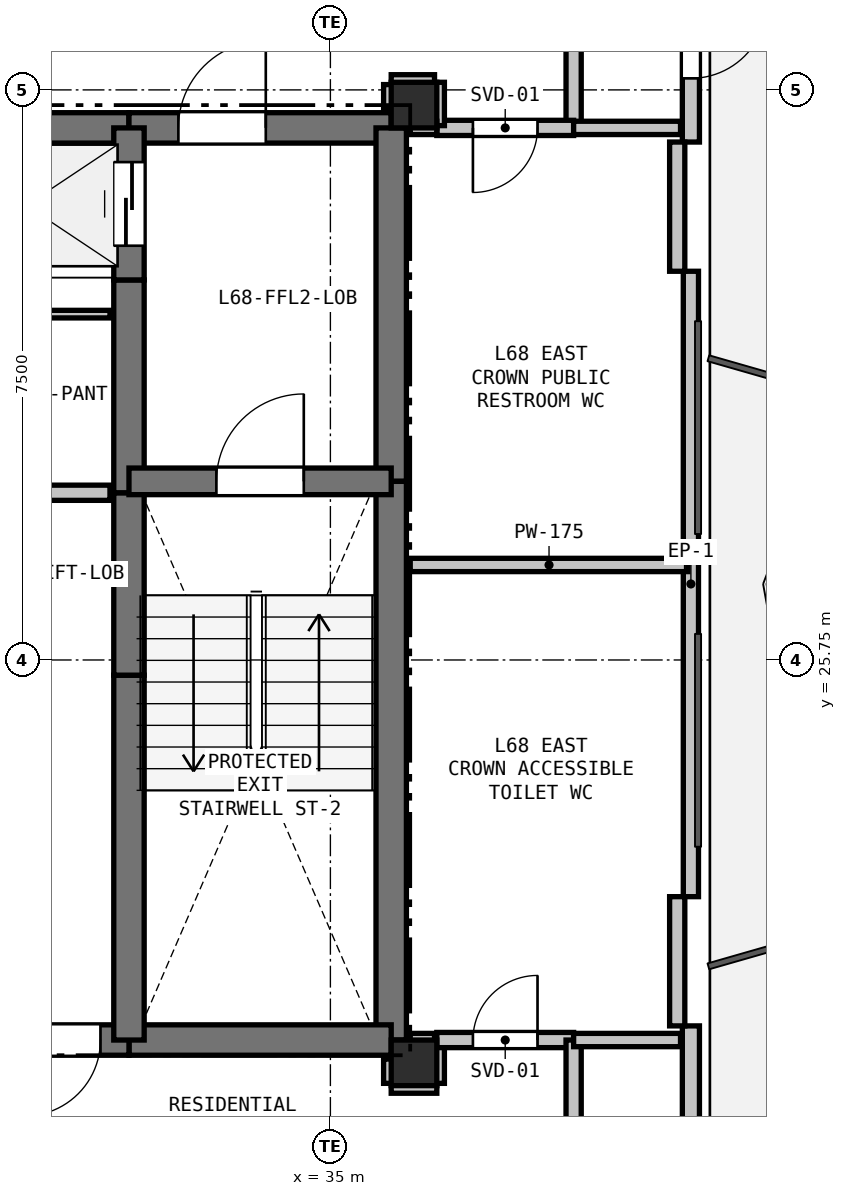
"""IFC4 building model, lengths in metres.
Left out: names, types, materials, properties, quantities, classifications, styles, units other than length and angle.
Written with IfcOpenShell. Run it as: python <this file> out.ifc"""

import sys

from ifc_helpers import new_model, si_unit, direction, frame, frame_2d, origin, origin_2d, place, context, subcontext, project, spatial, rectangle, extrude, element, fill, save


model = new_model("IFC4")
c1 = context("Model", 3, precision=1e-05, world=origin(), true_north=direction((0.0, 1.0)))
c2 = subcontext(c1, "Body", "Model", "MODEL_VIEW")
j1 = project(units=[si_unit("LENGTHUNIT", "METRE"), si_unit("PLANEANGLEUNIT", "RADIAN")], contexts=[c1])
p1 = place(None, origin())
s1 = spatial("IfcSite", under=j1, at=p1, CompositionType="ELEMENT")
p2 = place(p1, origin())
s2 = spatial("IfcBuilding", under=s1, at=p2, CompositionType="ELEMENT")
p3 = place(p2, frame((0.0, 0.0, 243.0)))
s3 = spatial("IfcBuildingStorey", under=s2, at=p3, CompositionType="ELEMENT", Elevation=243.0)
for number, where, z_axis, x_axis in (
    (1, (36.1, 33.05, 0.0), (0.0, 0.0, 1.0), (1.0, 0.0, 0.0)),
    (2, (36.1, 20.45, 0.0), (0.0, 0.0, 1.0), (1.0, 0.0, 0.0)),
):
    element("IfcColumn", number, at=place(p3, frame(where, z_axis=z_axis, x_axis=x_axis)), inside=s3, PredefinedType="COLUMN", context=c2, shape_type="SweptSolid", body=[
        extrude(rectangle(XDim=0.6, YDim=0.6, at=origin_2d()), origin(), (0.0, 0.0, 1.0), 3.3),
    ])
p4 = place(p3, frame((39.743, 41.492, 0.0), z_axis=(0.0, 0.0, 1.0), x_axis=(0.0, -1.0, 0.0)))
e3 = element("IfcWall", 3, at=p4, inside=s3, PredefinedType="SOLIDWALL", context=c2, shape_type="SweptSolid", body=[
    extrude(rectangle(XDim=8.928, YDim=0.225, at=frame_2d((4.464, 0.0))), origin(), (0.0, 0.0, 1.0), 2.7),
])
p5 = place(p4, frame((7.09, 0.0, 0.0)))
e4 = element("IfcOpeningElement", 4, at=p5, cuts=e3, PredefinedType="OPENING", context=c2, shape_type="SweptSolid", body=[
    extrude(rectangle(XDim=1.0, YDim=2.1, at=frame_2d((0.5, 1.05))), frame((0.0, 0.123, 0.0), z_axis=(0.0, -1.0, 0.0), x_axis=(1.0, 0.0, 0.0)), (0.0, 0.0, 1.0), 0.245),
])
p6 = place(p4, frame((1.406, 0.0, 0.9)))
e5 = element("IfcOpeningElement", 5, at=p6, cuts=e3, PredefinedType="OPENING", context=c2, shape_type="SweptSolid", body=[
    extrude(rectangle(XDim=1.2, YDim=1.4, at=frame_2d((0.6, 0.7))), frame((0.0, 0.123, 0.0), z_axis=(0.0, -1.0, 0.0), x_axis=(1.0, 0.0, 0.0)), (0.0, 0.0, 1.0), 0.245),
])
p7 = place(p3, frame((39.743, 30.864, 0.0), z_axis=(0.0, 0.0, 1.0), x_axis=(0.0, -1.0, 0.0)))
e6 = element("IfcWall", 6, at=p7, inside=s3, PredefinedType="PARAPET", context=c2, shape_type="SweptSolid", body=[
    extrude(rectangle(XDim=8.228, YDim=0.2, at=frame_2d((4.114, 0.0))), origin(), (0.0, 0.0, 1.0), 0.2),
])
p8 = place(p3, frame((39.743, 20.936, 0.0), z_axis=(0.0, 0.0, 1.0), x_axis=(0.0, -1.0, 0.0)))
e7 = element("IfcWall", 7, at=p8, inside=s3, PredefinedType="SOLIDWALL", context=c2, shape_type="SweptSolid", body=[
    extrude(rectangle(XDim=8.928, YDim=0.225, at=frame_2d((4.464, 0.0))), origin(), (0.0, 0.0, 1.0), 2.7),
])
p9 = place(p8, frame((5.56, 0.0, 0.9)))
e8 = element("IfcOpeningElement", 8, at=p9, cuts=e7, PredefinedType="OPENING", context=c2, shape_type="SweptSolid", body=[
    extrude(rectangle(XDim=1.8, YDim=1.5, at=frame_2d((0.9, 0.75))), frame((0.0, 0.123, 0.0), z_axis=(0.0, -1.0, 0.0), x_axis=(1.0, 0.0, 0.0)), (0.0, 0.0, 1.0), 0.245),
])
for number, where, z_axis, x_axis in (
    (9, (39.563, 32.564, 0.0), (0.0, 0.0, 1.0), (0.0, -1.0, 0.0)),
    (10, (39.563, 22.636, 0.0), (0.0, 0.0, 1.0), (0.0, -1.0, 0.0)),
):
    element("IfcWall", number, at=place(p3, frame(where, z_axis=z_axis, x_axis=x_axis)), inside=s3, PredefinedType="PARAPET", context=c2, shape_type="SweptSolid", body=[
        extrude(rectangle(XDim=1.7, YDim=0.2, at=frame_2d((0.85, 0.0))), origin(), (0.0, 0.0, 1.0), 2.7),
    ])
p10 = place(p3, frame((29.65, 32.75, 0.0), z_axis=(0.0, 0.0, 1.0), x_axis=(1.0, 0.0, 0.0)))
e11 = element("IfcWall", 11, at=p10, inside=s3, PredefinedType="SHEAR", context=c2, shape_type="SweptSolid", body=[
    extrude(rectangle(XDim=2.7, YDim=0.4, at=frame_2d((1.35, 0.0))), origin(), (0.0, 0.0, 1.0), 3.08),
])
p11 = place(p3, frame((32.35, 32.75, 0.0), z_axis=(0.0, 0.0, 1.0), x_axis=(1.0, 0.0, 0.0)))
e12 = element("IfcWall", 12, at=p11, inside=s3, PredefinedType="SHEAR", context=c2, shape_type="SweptSolid", body=[
    extrude(rectangle(XDim=3.45, YDim=0.4, at=frame_2d((1.725, 0.0))), origin(), (0.0, 0.0, 1.0), 3.08),
])
p12 = place(p11, frame((0.65, 0.0, 0.0)))
e13 = element("IfcOpeningElement", 13, at=p12, cuts=e12, PredefinedType="OPENING", context=c2, shape_type="SweptSolid", body=[
    extrude(rectangle(XDim=1.15, YDim=2.15, at=frame_2d((0.575, 1.075))), frame((0.0, 0.21, 0.0), z_axis=(0.0, -1.0, 0.0), x_axis=(1.0, 0.0, 0.0)), (0.0, 0.0, 1.0), 0.42),
])
p13 = place(p3, frame((35.8, 32.75, 0.0), z_axis=(0.0, 0.0, 1.0), x_axis=(0.0, -1.0, 0.0)))
e14 = element("IfcWall", 14, at=p13, inside=s3, PredefinedType="SHEAR", context=c2, shape_type="SweptSolid", body=[
    extrude(rectangle(XDim=4.65, YDim=0.4, at=frame_2d((2.325, 0.0))), origin(), (0.0, 0.0, 1.0), 3.08),
])
p14 = place(p3, frame((35.8, 28.1, 0.0), z_axis=(0.0, 0.0, 1.0), x_axis=(0.0, -1.0, 0.0)))
e15 = element("IfcWall", 15, at=p14, inside=s3, PredefinedType="SHEAR", context=c2, shape_type="SweptSolid", body=[
    extrude(rectangle(XDim=7.35, YDim=0.4, at=frame_2d((3.675, 0.0))), origin(), (0.0, 0.0, 1.0), 3.08),
])
p15 = place(p3, frame((35.8, 20.75, 0.0), z_axis=(0.0, 0.0, 1.0), x_axis=(-1.0, 0.0, 0.0)))
e16 = element("IfcWall", 16, at=p15, inside=s3, PredefinedType="SHEAR", context=c2, shape_type="SweptSolid", body=[
    extrude(rectangle(XDim=3.45, YDim=0.4, at=frame_2d((1.725, 0.0))), origin(), (0.0, 0.0, 1.0), 3.08),
])
p16 = place(p3, frame((32.35, 20.75, 0.0), z_axis=(0.0, 0.0, 1.0), x_axis=(-1.0, 0.0, 0.0)))
e17 = element("IfcWall", 17, at=p16, inside=s3, PredefinedType="SHEAR", context=c2, shape_type="SweptSolid", body=[
    extrude(rectangle(XDim=1.75, YDim=0.4, at=frame_2d((0.875, 0.0))), origin(), (0.0, 0.0, 1.0), 3.08),
])
p17 = place(p16, frame((0.375, 0.0, 0.0)))
e18 = element("IfcOpeningElement", 18, at=p17, cuts=e17, PredefinedType="OPENING", context=c2, shape_type="SweptSolid", body=[
    extrude(rectangle(XDim=1.0, YDim=2.15, at=frame_2d((0.5, 1.075))), frame((0.0, 0.21, 0.0), z_axis=(0.0, -1.0, 0.0), x_axis=(1.0, 0.0, 0.0)), (0.0, 0.0, 1.0), 0.42),
])
p18 = place(p3, frame((32.35, 20.75, 0.0), z_axis=(0.0, 0.0, 1.0), x_axis=(0.0, 1.0, 0.0)))
e19 = element("IfcWall", 19, at=p18, inside=s3, PredefinedType="SHEAR", context=c2, shape_type="SweptSolid", body=[
    extrude(rectangle(XDim=4.8, YDim=0.4, at=frame_2d((2.4, 0.0))), origin(), (0.0, 0.0, 1.0), 3.08),
])
p19 = place(p3, frame((32.35, 25.55, 0.0), z_axis=(0.0, 0.0, 1.0), x_axis=(0.0, 1.0, 0.0)))
e20 = element("IfcWall", 20, at=p19, inside=s3, PredefinedType="SHEAR", context=c2, shape_type="SweptSolid", body=[
    extrude(rectangle(XDim=2.4, YDim=0.4, at=frame_2d((1.2, 0.0))), origin(), (0.0, 0.0, 1.0), 3.08),
])
p20 = place(p3, frame((32.35, 27.95, 0.0), z_axis=(0.0, 0.0, 1.0), x_axis=(0.0, 1.0, 0.0)))
e21 = element("IfcWall", 21, at=p20, inside=s3, PredefinedType="SHEAR", context=c2, shape_type="SweptSolid", body=[
    extrude(rectangle(XDim=2.8, YDim=0.4, at=frame_2d((1.4, 0.0))), origin(), (0.0, 0.0, 1.0), 3.08),
])
p21 = place(p3, frame((32.35, 30.75, 0.0), z_axis=(0.0, 0.0, 1.0), x_axis=(0.0, 1.0, 0.0)))
e22 = element("IfcWall", 22, at=p21, inside=s3, PredefinedType="SHEAR", context=c2, shape_type="SweptSolid", body=[
    extrude(rectangle(XDim=2.0, YDim=0.4, at=frame_2d((1.0, 0.0))), origin(), (0.0, 0.0, 1.0), 3.08),
])
p22 = place(p21, frame((0.45, 0.0, 0.0)))
e23 = element("IfcOpeningElement", 23, at=p22, cuts=e22, PredefinedType="OPENING", context=c2, shape_type="SweptSolid", body=[
    extrude(rectangle(XDim=1.1, YDim=2.15, at=frame_2d((0.55, 1.075))), frame((0.0, 0.21, 0.0), z_axis=(0.0, -1.0, 0.0), x_axis=(1.0, 0.0, 0.0)), (0.0, 0.0, 1.0), 0.42),
])
p23 = place(p3, frame((32.35, 28.1, 0.0), z_axis=(0.0, 0.0, 1.0), x_axis=(1.0, 0.0, 0.0)))
e24 = element("IfcWall", 24, at=p23, inside=s3, PredefinedType="SHEAR", context=c2, shape_type="SweptSolid", body=[
    extrude(rectangle(XDim=3.45, YDim=0.35, at=frame_2d((1.725, 0.0))), origin(), (0.0, 0.0, 1.0), 3.08),
])
p24 = place(p23, frame((1.15, 0.0, 0.0)))
e25 = element("IfcOpeningElement", 25, at=p24, cuts=e24, PredefinedType="OPENING", context=c2, shape_type="SweptSolid", body=[
    extrude(rectangle(XDim=1.15, YDim=2.15, at=frame_2d((0.575, 1.075))), frame((0.0, 0.185, 0.0), z_axis=(0.0, -1.0, 0.0), x_axis=(1.0, 0.0, 0.0)), (0.0, 0.0, 1.0), 0.37),
])
p25 = place(p3, frame((32.1, 30.3, 0.0), z_axis=(0.0, 0.0, 1.0), x_axis=(-1.0, 0.0, 0.0)))
e26 = element("IfcWall", 26, at=p25, inside=s3, PredefinedType="PARTITIONING", context=c2, shape_type="SweptSolid", body=[
    extrude(rectangle(XDim=2.45, YDim=0.1, at=frame_2d((1.225, 0.0))), origin(), (0.0, 0.0, 1.0), 3.08),
])
p26 = place(p3, frame((27.4, 27.95, 0.0), z_axis=(0.0, 0.0, 1.0), x_axis=(1.0, 0.0, 0.0)))
e27 = element("IfcWall", 27, at=p26, inside=s3, PredefinedType="PARTITIONING", context=c2, shape_type="SweptSolid", body=[
    extrude(rectangle(XDim=4.7, YDim=0.2, at=frame_2d((2.35, 0.0))), origin(), (0.0, 0.0, 1.0), 3.08),
])
p27 = place(p26, frame((1.85, 0.0, 0.0)))
e28 = element("IfcOpeningElement", 28, at=p27, cuts=e27, PredefinedType="OPENING", context=c2, shape_type="SweptSolid", body=[
    extrude(rectangle(XDim=1.0, YDim=2.15, at=frame_2d((0.5, 1.075))), frame((0.0, 0.11, 0.0), z_axis=(0.0, -1.0, 0.0), x_axis=(1.0, 0.0, 0.0)), (0.0, 0.0, 1.0), 0.22),
])
p28 = place(p3, frame((38.2, 35.2, 0.0), z_axis=(0.0, 0.0, 1.0), x_axis=(0.0, -1.0, 0.0)))
e29 = element("IfcWall", 29, at=p28, inside=s3, PredefinedType="PARTITIONING", context=c2, shape_type="SweptSolid", body=[
    extrude(rectangle(XDim=2.45, YDim=0.2, at=frame_2d((1.225, 0.0))), origin(), (0.0, 0.0, 1.0), 3.08),
])
p29 = place(p3, frame((38.2, 32.75, 0.0), z_axis=(0.0, 0.0, 1.0), x_axis=(-1.0, 0.0, 0.0)))
e30 = element("IfcWall", 30, at=p29, inside=s3, PredefinedType="PARTITIONING", context=c2, shape_type="SweptSolid", body=[
    extrude(rectangle(XDim=1.8, YDim=0.2, at=frame_2d((0.9, 0.0))), origin(), (0.0, 0.0, 1.0), 3.08),
])
p30 = place(p29, frame((0.475, 0.0, 0.0)))
e31 = element("IfcOpeningElement", 31, at=p30, cuts=e30, PredefinedType="OPENING", context=c2, shape_type="SweptSolid", body=[
    extrude(rectangle(XDim=0.85, YDim=2.1, at=frame_2d((0.425, 1.05))), frame((0.0, 0.11, 0.0), z_axis=(0.0, -1.0, 0.0), x_axis=(1.0, 0.0, 0.0)), (0.0, 0.0, 1.0), 0.22),
])
for number, where, z_axis, x_axis in (
    (32, (36.4, 32.78, 0.0), (0.0, 0.0, 1.0), (0.0, 1.0, 0.0)),
    (33, (36.37, 33.35, 0.0), (0.0, 0.0, 1.0), (-1.0, 0.0, 0.0)),
):
    element("IfcWall", number, at=place(p3, frame(where, z_axis=z_axis, x_axis=x_axis)), inside=s3, PredefinedType="PARTITIONING", context=c2, shape_type="SweptSolid", body=[
        extrude(rectangle(XDim=0.57, YDim=0.2, at=frame_2d((0.285, 0.0))), origin(), (0.0, 0.0, 1.0), 2.528),
    ])
p31 = place(p3, frame((35.8, 33.32, 0.0), z_axis=(0.0, 0.0, 1.0), x_axis=(0.0, -1.0, 0.0)))
e34 = element("IfcWall", 34, at=p31, inside=s3, PredefinedType="PARTITIONING", context=c2, shape_type="SweptSolid", body=[
    extrude(rectangle(XDim=0.32, YDim=0.2, at=frame_2d((0.16, 0.0))), origin(), (0.0, 0.0, 1.0), 2.605),
])
p32 = place(p3, frame((35.8, 20.15, 0.0), z_axis=(0.0, 0.0, 1.0), x_axis=(1.0, 0.0, 0.0)))
e35 = element("IfcWall", 35, at=p32, inside=s3, PredefinedType="PARTITIONING", context=c2, shape_type="SweptSolid", body=[
    extrude(rectangle(XDim=0.6, YDim=0.2, at=frame_2d((0.3, 0.0))), origin(), (0.0, 0.0, 1.0), 2.528),
])
p33 = place(p3, frame((36.4, 20.18, 0.0), z_axis=(0.0, 0.0, 1.0), x_axis=(0.0, 1.0, 0.0)))
e36 = element("IfcWall", 36, at=p33, inside=s3, PredefinedType="PARTITIONING", context=c2, shape_type="SweptSolid", body=[
    extrude(rectangle(XDim=0.57, YDim=0.2, at=frame_2d((0.285, 0.0))), origin(), (0.0, 0.0, 1.0), 3.08),
])
p34 = place(p3, frame((36.4, 20.75, 0.0), z_axis=(0.0, 0.0, 1.0), x_axis=(1.0, 0.0, 0.0)))
e37 = element("IfcWall", 37, at=p34, inside=s3, PredefinedType="PARTITIONING", context=c2, shape_type="SweptSolid", body=[
    extrude(rectangle(XDim=1.8, YDim=0.2, at=frame_2d((0.9, 0.0))), origin(), (0.0, 0.0, 1.0), 3.08),
])
p35 = place(p34, frame((0.475, 0.0, 0.0)))
e38 = element("IfcOpeningElement", 38, at=p35, cuts=e37, PredefinedType="OPENING", context=c2, shape_type="SweptSolid", body=[
    extrude(rectangle(XDim=0.85, YDim=2.1, at=frame_2d((0.425, 1.05))), frame((0.0, 0.11, 0.0), z_axis=(0.0, -1.0, 0.0), x_axis=(1.0, 0.0, 0.0)), (0.0, 0.0, 1.0), 0.22),
])
p36 = place(p3, frame((38.2, 20.75, 0.0), z_axis=(0.0, 0.0, 1.0), x_axis=(0.0, -1.0, 0.0)))
e39 = element("IfcWall", 39, at=p36, inside=s3, PredefinedType="PARTITIONING", context=c2, shape_type="SweptSolid", body=[
    extrude(rectangle(XDim=2.45, YDim=0.2, at=frame_2d((1.225, 0.0))), origin(), (0.0, 0.0, 1.0), 3.08),
])
p37 = place(p3, frame((35.8, 20.5, 0.0), z_axis=(0.0, 0.0, 1.0), x_axis=(0.0, -1.0, 0.0)))
e40 = element("IfcWall", 40, at=p37, inside=s3, PredefinedType="PARTITIONING", context=c2, shape_type="SweptSolid", body=[
    extrude(rectangle(XDim=0.32, YDim=0.2, at=frame_2d((0.16, 0.0))), origin(), (0.0, 0.0, 1.0), 2.605),
])
p38 = place(p3, frame((36.05, 32.75, 0.0), z_axis=(0.0, 0.0, 1.0), x_axis=(1.0, 0.0, 0.0)))
e41 = element("IfcWall", 41, at=p38, inside=s3, PredefinedType="PLUMBINGWALL", context=c2, shape_type="SweptSolid", body=[
    extrude(rectangle(XDim=0.35, YDim=0.175, at=frame_2d((0.175, 0.0))), origin(), (0.0, 0.0, 1.0), 2.605),
])
p39 = place(p3, frame((38.2, 32.75, 0.0), z_axis=(0.0, 0.0, 1.0), x_axis=(1.0, 0.0, 0.0)))
e42 = element("IfcWall", 42, at=p39, inside=s3, PredefinedType="PLUMBINGWALL", context=c2, shape_type="SweptSolid", body=[
    extrude(rectangle(XDim=1.406, YDim=0.175, at=frame_2d((0.703, 0.0))), origin(), (0.0, 0.0, 1.0), 2.365),
])
p40 = place(p3, frame((39.703, 27.0, 0.0), z_axis=(0.0, 0.0, 1.0), x_axis=(-1.0, 0.0, 0.0)))
e43 = element("IfcWall", 43, at=p40, inside=s3, PredefinedType="PLUMBINGWALL", context=c2, shape_type="SweptSolid", body=[
    extrude(rectangle(XDim=3.653, YDim=0.175, at=frame_2d((1.826, 0.0))), origin(), (0.0, 0.0, 1.0), 2.365),
])
p41 = place(p3, frame((39.606, 20.75, 0.0), z_axis=(0.0, 0.0, 1.0), x_axis=(-1.0, 0.0, 0.0)))
e44 = element("IfcWall", 44, at=p41, inside=s3, PredefinedType="PLUMBINGWALL", context=c2, shape_type="SweptSolid", body=[
    extrude(rectangle(XDim=1.406, YDim=0.175, at=frame_2d((0.703, 0.0))), origin(), (0.0, 0.0, 1.0), 2.365),
])
p42 = place(p3, frame((36.37, 20.75, 0.0), z_axis=(0.0, 0.0, 1.0), x_axis=(-1.0, 0.0, 0.0)))
e45 = element("IfcWall", 45, at=p42, inside=s3, PredefinedType="PLUMBINGWALL", context=c2, shape_type="SweptSolid", body=[
    extrude(rectangle(XDim=0.32, YDim=0.175, at=frame_2d((0.16, 0.0))), origin(), (0.0, 0.0, 1.0), 2.605),
])
p43 = place(p5, origin())
e46 = element("IfcDoor", 46, at=p43, inside=s3, OperationType="SINGLE_SWING_LEFT", PredefinedType="DOOR", context=c2, shape_type="SweptSolid", body=[
    extrude(rectangle(XDim=1.0, YDim=2.1, at=frame_2d((0.5, 1.05))), frame((0.0, 0.025, 0.0), z_axis=(0.0, -1.0, 0.0), x_axis=(1.0, 0.0, 0.0)), (0.0, 0.0, 1.0), 0.05),
])
fill(e4, e46)
p44 = place(p17, origin())
e47 = element("IfcDoor", 47, at=p44, inside=s3, OperationType="SINGLE_SWING_RIGHT", PredefinedType="DOOR", context=c2, shape_type="SweptSolid", body=[
    extrude(rectangle(XDim=1.0, YDim=2.15, at=frame_2d((0.5, 1.075))), frame((0.0, 0.025, 0.0), z_axis=(0.0, -1.0, 0.0), x_axis=(1.0, 0.0, 0.0)), (0.0, 0.0, 1.0), 0.05),
])
fill(e18, e47)
p45 = place(p22, origin())
e48 = element("IfcDoor", 48, at=p45, inside=s3, OperationType="SLIDING_TO_LEFT", PredefinedType="DOOR", context=c2, shape_type="SweptSolid", body=[
    extrude(rectangle(XDim=1.1, YDim=2.15, at=frame_2d((0.55, 1.075))), frame((0.0, 0.025, 0.0), z_axis=(0.0, -1.0, 0.0), x_axis=(1.0, 0.0, 0.0)), (0.0, 0.0, 1.0), 0.05),
])
fill(e23, e48)
p46 = place(p24, origin())
e49 = element("IfcDoor", 49, at=p46, inside=s3, OperationType="SINGLE_SWING_RIGHT", PredefinedType="DOOR", context=c2, shape_type="SweptSolid", body=[
    extrude(rectangle(XDim=1.15, YDim=2.15, at=frame_2d((0.575, 1.075))), frame((0.0, 0.025, 0.0), z_axis=(0.0, -1.0, 0.0), x_axis=(1.0, 0.0, 0.0)), (0.0, 0.0, 1.0), 0.05),
])
fill(e25, e49)
p47 = place(p12, origin())
e50 = element("IfcDoor", 50, at=p47, inside=s3, OperationType="SINGLE_SWING_RIGHT", PredefinedType="DOOR", context=c2, shape_type="SweptSolid", body=[
    extrude(rectangle(XDim=1.15, YDim=2.15, at=frame_2d((0.575, 1.075))), frame((0.0, 0.025, 0.0), z_axis=(0.0, -1.0, 0.0), x_axis=(1.0, 0.0, 0.0)), (0.0, 0.0, 1.0), 0.05),
])
fill(e13, e50)
p48 = place(p30, origin())
e51 = element("IfcDoor", 51, at=p48, inside=s3, OperationType="SINGLE_SWING_RIGHT", PredefinedType="DOOR", context=c2, shape_type="SweptSolid", body=[
    extrude(rectangle(XDim=0.85, YDim=2.1, at=frame_2d((0.425, 1.05))), frame((0.0, 0.025, 0.0), z_axis=(0.0, -1.0, 0.0), x_axis=(1.0, 0.0, 0.0)), (0.0, 0.0, 1.0), 0.05),
])
fill(e31, e51)
p49 = place(p35, origin())
e52 = element("IfcDoor", 52, at=p49, inside=s3, OperationType="SINGLE_SWING_RIGHT", PredefinedType="DOOR", context=c2, shape_type="SweptSolid", body=[
    extrude(rectangle(XDim=0.85, YDim=2.1, at=frame_2d((0.425, 1.05))), frame((0.0, 0.025, 0.0), z_axis=(0.0, -1.0, 0.0), x_axis=(1.0, 0.0, 0.0)), (0.0, 0.0, 1.0), 0.05),
])
fill(e38, e52)
save(model, sys.argv[1])
